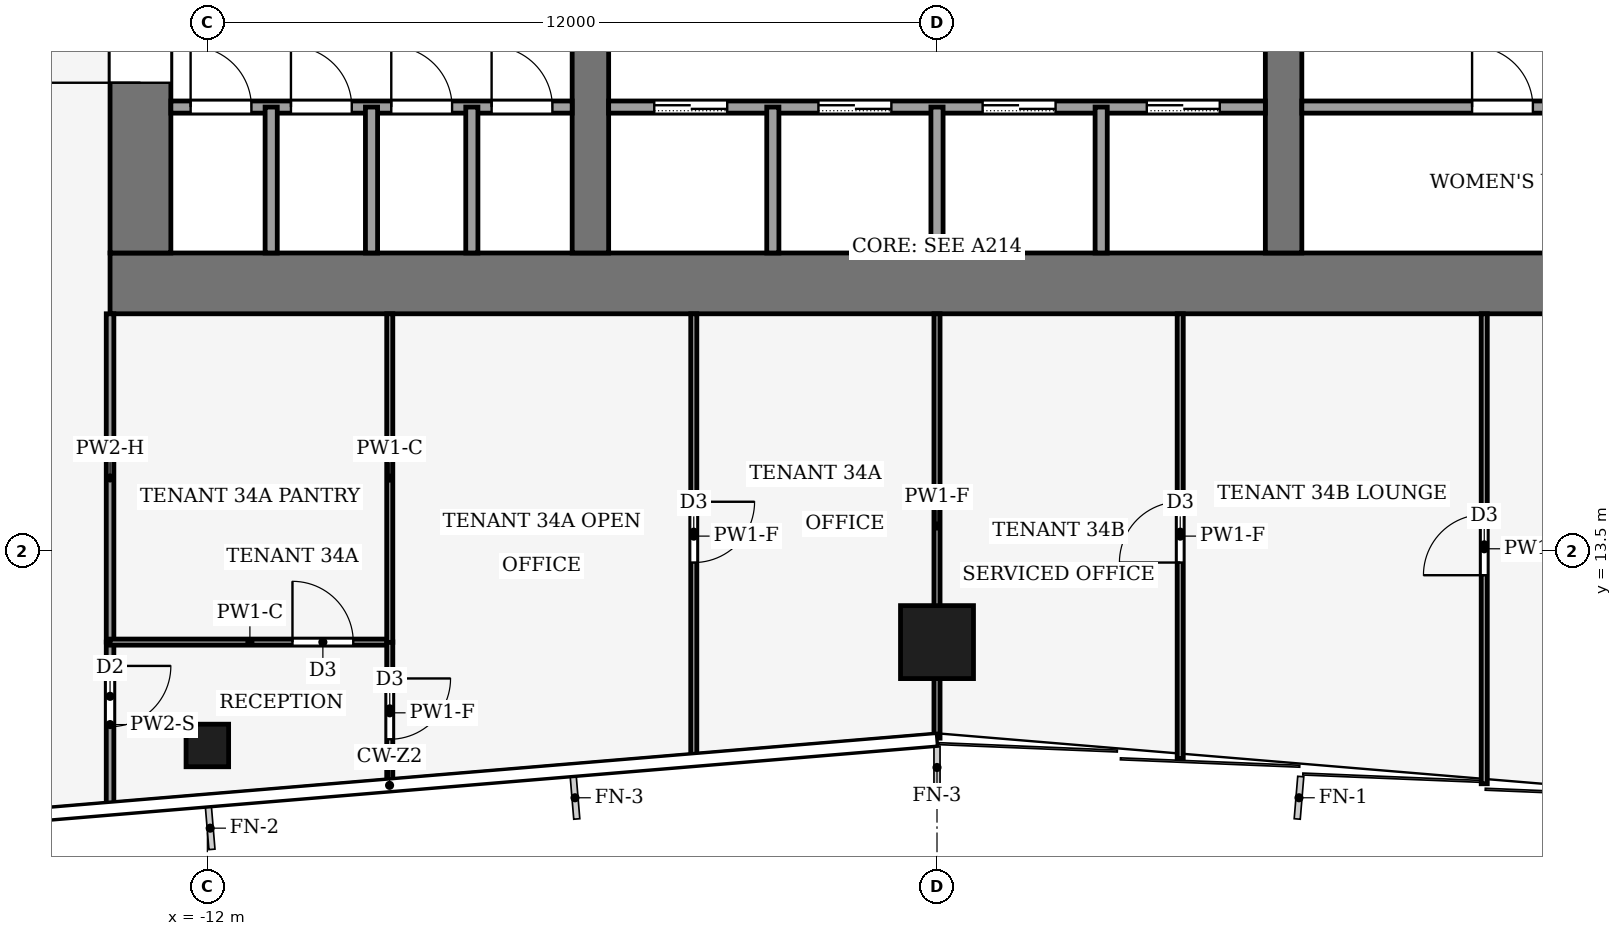
"""IFC4 building model, lengths in metres.
Left out: names, types, materials, properties, quantities, classifications, styles, units other than length and angle.
Written with IfcOpenShell. Run it as: python <this file> out.ifc"""

import sys

from ifc_helpers import new_model, si_unit, direction, frame, frame_2d, origin, origin_2d, place, context, subcontext, project, spatial, rectangle, hollow_rectangle, extrude, element, fill, save


model = new_model("IFC4")
c1 = context("Model", 3, precision=1e-05, world=origin(), true_north=direction((0.0, 1.0)))
c2 = subcontext(c1, "Body", "Model", "MODEL_VIEW")
j1 = project(units=[si_unit("LENGTHUNIT", "METRE"), si_unit("PLANEANGLEUNIT", "RADIAN")], contexts=[c1])
p1 = place(None, origin())
s1 = spatial("IfcSite", under=j1, at=p1, CompositionType="ELEMENT")
p2 = place(p1, origin())
s2 = spatial("IfcBuilding", under=s1, at=p2, CompositionType="ELEMENT")
p3 = place(p2, frame((0.0, 0.0, 150.0)))
s3 = spatial("IfcBuildingStorey", under=s2, at=p3, CompositionType="ELEMENT", Elevation=150.0)
p4 = place(p3, frame((-13.6, 17.9, -0.13), z_axis=(0.0, 0.0, 1.0), x_axis=(1.0, 0.0, 0.0)))
e1 = element("IfcWall", 1, at=p4, inside=s3, PredefinedType="SHEAR", context=c2, shape_type="SweptSolid", body=[
    extrude(rectangle(XDim=27.2, YDim=1.0, at=frame_2d((13.6, 0.0))), origin(), (0.0, 0.0, 1.0), 4.0),
])
p5 = place(p3, frame((-13.1, 18.4, -0.13), z_axis=(0.0, 0.0, 1.0), x_axis=(0.0, 1.0, 0.0)))
e2 = element("IfcWall", 2, at=p5, inside=s3, PredefinedType="SHEAR", context=c2, shape_type="SweptSolid", body=[
    extrude(rectangle(XDim=19.2, YDim=1.0, at=frame_2d((9.6, 0.0))), origin(), (0.0, 0.0, 1.0), 4.0),
])
p6 = place(p5, frame((2.8, 0.0, 0.13)))
e3 = element("IfcOpeningElement", 3, at=p6, cuts=e2, PredefinedType="OPENING", context=c2, shape_type="SweptSolid", body=[
    extrude(rectangle(XDim=2.4, YDim=2.4, at=frame_2d((1.2, 1.2))), frame((0.0, 0.51, 0.0), z_axis=(0.0, -1.0, 0.0), x_axis=(1.0, 0.0, 0.0)), (0.0, 0.0, 1.0), 1.02),
])
p7 = place(p5, frame((13.4, 0.0, 0.13)))
e4 = element("IfcOpeningElement", 4, at=p7, cuts=e2, PredefinedType="OPENING", context=c2, shape_type="SweptSolid", body=[
    extrude(rectangle(XDim=1.4, YDim=2.2, at=frame_2d((0.7, 1.1))), frame((0.0, 0.51, 0.0), z_axis=(0.0, -1.0, 0.0), x_axis=(1.0, 0.0, 0.0)), (0.0, 0.0, 1.0), 1.02),
])
p8 = place(p3, frame((-5.7, 18.4, -0.13), z_axis=(0.0, 0.0, 1.0), x_axis=(0.0, 1.0, 0.0)))
e5 = element("IfcWall", 5, at=p8, inside=s3, PredefinedType="SHEAR", context=c2, shape_type="SweptSolid", body=[
    extrude(rectangle(XDim=19.2, YDim=0.6, at=frame_2d((9.6, 0.0))), origin(), (0.0, 0.0, 1.0), 4.0),
])
p9 = place(p8, frame((8.35, 0.0, 0.13)))
e6 = element("IfcOpeningElement", 6, at=p9, cuts=e5, PredefinedType="OPENING", context=c2, shape_type="SweptSolid", body=[
    extrude(rectangle(XDim=0.9, YDim=2.1, at=frame_2d((0.45, 1.05))), frame((0.0, 0.31, 0.0), z_axis=(0.0, -1.0, 0.0), x_axis=(1.0, 0.0, 0.0)), (0.0, 0.0, 1.0), 0.62),
])
p10 = place(p3, frame((5.7, 18.4, -0.13), z_axis=(0.0, 0.0, 1.0), x_axis=(0.0, 1.0, 0.0)))
e7 = element("IfcWall", 7, at=p10, inside=s3, PredefinedType="SHEAR", context=c2, shape_type="SweptSolid", body=[
    extrude(rectangle(XDim=19.2, YDim=0.6, at=frame_2d((9.6, 0.0))), origin(), (0.0, 0.0, 1.0), 4.0),
])
p11 = place(p10, frame((8.35, 0.0, 0.13)))
e8 = element("IfcOpeningElement", 8, at=p11, cuts=e7, PredefinedType="OPENING", context=c2, shape_type="SweptSolid", body=[
    extrude(rectangle(XDim=0.9, YDim=2.1, at=frame_2d((0.45, 1.05))), frame((0.0, 0.31, 0.0), z_axis=(0.0, -1.0, 0.0), x_axis=(1.0, 0.0, 0.0)), (0.0, 0.0, 1.0), 0.62),
])
p12 = place(p10, frame((13.3, 0.0, 0.13)))
e9 = element("IfcOpeningElement", 9, at=p12, cuts=e7, PredefinedType="OPENING", context=c2, shape_type="SweptSolid", body=[
    extrude(rectangle(XDim=2.4, YDim=2.4, at=frame_2d((1.2, 1.2))), frame((0.0, 0.31, 0.0), z_axis=(0.0, -1.0, 0.0), x_axis=(1.0, 0.0, 0.0)), (0.0, 0.0, 1.0), 0.62),
])
p13 = place(p3, frame((0.0, 12.0, 0.0), z_axis=(0.0, 0.0, 1.0), x_axis=(1.0, 0.0, 0.0)))
e10 = element("IfcColumn", 10, at=p13, inside=s3, PredefinedType="COLUMN", context=c2, shape_type="SweptSolid", body=[
    extrude(hollow_rectangle(XDim=1.2, YDim=1.2, WallThickness=0.07, at=origin_2d()), origin(), (0.0, 0.0, 1.0), 4.0),
])
p14 = place(p3, frame((-12.0, 10.3, 0.0), z_axis=(0.0, 0.0, 1.0), x_axis=(1.0, 0.0, 0.0)))
e11 = element("IfcColumn", 11, at=p14, inside=s3, PredefinedType="COLUMN", context=c2, shape_type="SweptSolid", body=[
    extrude(hollow_rectangle(XDim=0.7, YDim=0.7, WallThickness=0.03, at=origin_2d()), origin(), (0.0, 0.0, 1.0), 4.0),
])
p15 = place(p3, frame((-12.6, 20.8, 0.0), z_axis=(0.0, 0.0, 1.0), x_axis=(1.0, 0.0, 0.0)))
e12 = element("IfcWall", 12, at=p15, inside=s3, PredefinedType="PARTITIONING", context=c2, shape_type="SweptSolid", body=[
    extrude(rectangle(XDim=6.6, YDim=0.2, at=frame_2d((3.3, 0.0))), origin(), (0.0, 0.0, 1.0), 3.87),
])
p16 = place(p15, frame((0.325, 0.0, 0.0)))
e13 = element("IfcOpeningElement", 13, at=p16, cuts=e12, PredefinedType="OPENING", context=c2, shape_type="SweptSolid", body=[
    extrude(rectangle(XDim=1.0, YDim=2.1, at=frame_2d((0.5, 1.05))), frame((0.0, 0.11, 0.0), z_axis=(0.0, -1.0, 0.0), x_axis=(1.0, 0.0, 0.0)), (0.0, 0.0, 1.0), 0.22),
])
p17 = place(p15, frame((1.975, 0.0, 0.0)))
e14 = element("IfcOpeningElement", 14, at=p17, cuts=e12, PredefinedType="OPENING", context=c2, shape_type="SweptSolid", body=[
    extrude(rectangle(XDim=1.0, YDim=2.1, at=frame_2d((0.5, 1.05))), frame((0.0, 0.11, 0.0), z_axis=(0.0, -1.0, 0.0), x_axis=(1.0, 0.0, 0.0)), (0.0, 0.0, 1.0), 0.22),
])
p18 = place(p15, frame((3.625, 0.0, 0.0)))
e15 = element("IfcOpeningElement", 15, at=p18, cuts=e12, PredefinedType="OPENING", context=c2, shape_type="SweptSolid", body=[
    extrude(rectangle(XDim=1.0, YDim=2.1, at=frame_2d((0.5, 1.05))), frame((0.0, 0.11, 0.0), z_axis=(0.0, -1.0, 0.0), x_axis=(1.0, 0.0, 0.0)), (0.0, 0.0, 1.0), 0.22),
])
p19 = place(p15, frame((5.275, 0.0, 0.0)))
e16 = element("IfcOpeningElement", 16, at=p19, cuts=e12, PredefinedType="OPENING", context=c2, shape_type="SweptSolid", body=[
    extrude(rectangle(XDim=1.0, YDim=2.1, at=frame_2d((0.5, 1.05))), frame((0.0, 0.11, 0.0), z_axis=(0.0, -1.0, 0.0), x_axis=(1.0, 0.0, 0.0)), (0.0, 0.0, 1.0), 0.22),
])
p20 = place(p3, frame((-5.4, 20.8, 0.0), z_axis=(0.0, 0.0, 1.0), x_axis=(1.0, 0.0, 0.0)))
e17 = element("IfcWall", 17, at=p20, inside=s3, PredefinedType="PARTITIONING", context=c2, shape_type="SweptSolid", body=[
    extrude(rectangle(XDim=10.8, YDim=0.2, at=frame_2d((5.4, 0.0))), origin(), (0.0, 0.0, 1.0), 3.87),
])
p21 = place(p20, frame((0.75, 0.0, 0.0)))
e18 = element("IfcOpeningElement", 18, at=p21, cuts=e17, PredefinedType="OPENING", context=c2, shape_type="SweptSolid", body=[
    extrude(rectangle(XDim=1.2, YDim=2.2, at=frame_2d((0.6, 1.1))), frame((0.0, 0.11, 0.0), z_axis=(0.0, -1.0, 0.0), x_axis=(1.0, 0.0, 0.0)), (0.0, 0.0, 1.0), 0.22),
])
p22 = place(p20, frame((3.45, 0.0, 0.0)))
e19 = element("IfcOpeningElement", 19, at=p22, cuts=e17, PredefinedType="OPENING", context=c2, shape_type="SweptSolid", body=[
    extrude(rectangle(XDim=1.2, YDim=2.2, at=frame_2d((0.6, 1.1))), frame((0.0, 0.11, 0.0), z_axis=(0.0, -1.0, 0.0), x_axis=(1.0, 0.0, 0.0)), (0.0, 0.0, 1.0), 0.22),
])
p23 = place(p20, frame((6.15, 0.0, 0.0)))
e20 = element("IfcOpeningElement", 20, at=p23, cuts=e17, PredefinedType="OPENING", context=c2, shape_type="SweptSolid", body=[
    extrude(rectangle(XDim=1.2, YDim=2.2, at=frame_2d((0.6, 1.1))), frame((0.0, 0.11, 0.0), z_axis=(0.0, -1.0, 0.0), x_axis=(1.0, 0.0, 0.0)), (0.0, 0.0, 1.0), 0.22),
])
p24 = place(p20, frame((8.85, 0.0, 0.0)))
e21 = element("IfcOpeningElement", 21, at=p24, cuts=e17, PredefinedType="OPENING", context=c2, shape_type="SweptSolid", body=[
    extrude(rectangle(XDim=1.2, YDim=2.2, at=frame_2d((0.6, 1.1))), frame((0.0, 0.11, 0.0), z_axis=(0.0, -1.0, 0.0), x_axis=(1.0, 0.0, 0.0)), (0.0, 0.0, 1.0), 0.22),
])
p25 = place(p3, frame((6.0, 20.8, 0.0), z_axis=(0.0, 0.0, 1.0), x_axis=(1.0, 0.0, 0.0)))
e22 = element("IfcWall", 22, at=p25, inside=s3, PredefinedType="PARTITIONING", context=c2, shape_type="SweptSolid", body=[
    extrude(rectangle(XDim=6.6, YDim=0.2, at=frame_2d((3.3, 0.0))), origin(), (0.0, 0.0, 1.0), 3.87),
])
p26 = place(p25, frame((2.8, 0.0, 0.0)))
e23 = element("IfcOpeningElement", 23, at=p26, cuts=e22, PredefinedType="OPENING", context=c2, shape_type="SweptSolid", body=[
    extrude(rectangle(XDim=1.0, YDim=2.1, at=frame_2d((0.5, 1.05))), frame((0.0, 0.11, 0.0), z_axis=(0.0, -1.0, 0.0), x_axis=(1.0, 0.0, 0.0)), (0.0, 0.0, 1.0), 0.22),
])
for number, where, z_axis, x_axis in (
    (24, (-10.95, 18.4, 0.0), (0.0, 0.0, 1.0), (0.0, 1.0, 0.0)),
    (25, (-9.3, 18.4, 0.0), (0.0, 0.0, 1.0), (0.0, 1.0, 0.0)),
    (26, (-7.65, 18.4, 0.0), (0.0, 0.0, 1.0), (0.0, 1.0, 0.0)),
    (27, (-2.7, 18.4, 0.0), (0.0, 0.0, 1.0), (0.0, 1.0, 0.0)),
    (28, (0.0, 18.4, 0.0), (0.0, 0.0, 1.0), (0.0, 1.0, 0.0)),
    (29, (2.7, 18.4, 0.0), (0.0, 0.0, 1.0), (0.0, 1.0, 0.0)),
):
    element("IfcWall", number, at=place(p3, frame(where, z_axis=z_axis, x_axis=x_axis)), inside=s3, PredefinedType="PARTITIONING", context=c2, shape_type="SweptSolid", body=[
        extrude(rectangle(XDim=2.4, YDim=0.2, at=frame_2d((1.2, 0.0))), origin(), (0.0, 0.0, 1.0), 3.87),
    ])
p27 = place(p3, frame((-13.6, 12.0, 0.0), z_axis=(0.0, 0.0, 1.0), x_axis=(0.0, -1.0, 0.0)))
e30 = element("IfcWall", 30, at=p27, inside=s3, PredefinedType="PARTITIONING", context=c2, shape_type="SweptSolid", body=[
    extrude(rectangle(XDim=2.713, YDim=0.125, at=frame_2d((1.357, 0.0))), origin(), (0.0, 0.0, 1.0), 3.04),
])
p28 = place(p27, frame((0.392, 0.0, 0.0)))
e31 = element("IfcOpeningElement", 31, at=p28, cuts=e30, PredefinedType="OPENING", context=c2, shape_type="SweptSolid", body=[
    extrude(rectangle(XDim=1.0, YDim=2.1, at=frame_2d((0.5, 1.05))), frame((0.0, 0.073, 0.0), z_axis=(0.0, -1.0, 0.0), x_axis=(1.0, 0.0, 0.0)), (0.0, 0.0, 1.0), 0.145),
])
p29 = place(p3, frame((-13.6, 12.0, 0.0), z_axis=(0.0, 0.0, 1.0), x_axis=(0.0, 1.0, 0.0)))
e32 = element("IfcWall", 32, at=p29, inside=s3, PredefinedType="PARTITIONING", context=c2, shape_type="SweptSolid", body=[
    extrude(rectangle(XDim=5.4, YDim=0.125, at=frame_2d((2.7, 0.0))), origin(), (0.0, 0.0, 1.0), 3.14),
])
p30 = place(p3, frame((-13.6, 12.0, 0.0), z_axis=(0.0, 0.0, 1.0), x_axis=(1.0, 0.0, 0.0)))
e33 = element("IfcWall", 33, at=p30, inside=s3, PredefinedType="PARTITIONING", context=c2, shape_type="SweptSolid", body=[
    extrude(rectangle(XDim=4.6, YDim=0.1, at=frame_2d((2.3, 0.0))), origin(), (0.0, 0.0, 1.0), 3.87),
])
p31 = place(p30, frame((3.0, 0.0, 0.0)))
e34 = element("IfcOpeningElement", 34, at=p31, cuts=e33, PredefinedType="OPENING", context=c2, shape_type="SweptSolid", body=[
    extrude(rectangle(XDim=1.0, YDim=2.1, at=frame_2d((0.5, 1.05))), frame((0.0, 0.06, 0.0), z_axis=(0.0, -1.0, 0.0), x_axis=(1.0, 0.0, 0.0)), (0.0, 0.0, 1.0), 0.12),
])
p32 = place(p3, frame((-9.0, 12.004, 0.0), z_axis=(0.0, 0.0, 1.0), x_axis=(0.0, -1.0, 0.0)))
e35 = element("IfcWall", 35, at=p32, inside=s3, PredefinedType="PARTITIONING", context=c2, shape_type="SweptSolid", body=[
    extrude(rectangle(XDim=2.334, YDim=0.1, at=frame_2d((1.167, 0.0))), origin(), (0.0, 0.0, 1.0), 3.04),
])
p33 = place(p32, frame((0.602, 0.0, 0.0)))
e36 = element("IfcOpeningElement", 36, at=p33, cuts=e35, PredefinedType="OPENING", context=c2, shape_type="SweptSolid", body=[
    extrude(rectangle(XDim=1.0, YDim=2.1, at=frame_2d((0.5, 1.05))), frame((0.0, 0.06, 0.0), z_axis=(0.0, -1.0, 0.0), x_axis=(1.0, 0.0, 0.0)), (0.0, 0.0, 1.0), 0.12),
])
p34 = place(p3, frame((-9.0, 11.996, 0.0), z_axis=(0.0, 0.0, 1.0), x_axis=(0.0, 1.0, 0.0)))
e37 = element("IfcWall", 37, at=p34, inside=s3, PredefinedType="PARTITIONING", context=c2, shape_type="SweptSolid", body=[
    extrude(rectangle(XDim=5.404, YDim=0.1, at=frame_2d((2.702, 0.0))), origin(), (0.0, 0.0, 1.0), 3.87),
])
p35 = place(p3, frame((-4.0, 17.4, 0.0), z_axis=(0.0, 0.0, 1.0), x_axis=(0.0, -1.0, 0.0)))
e38 = element("IfcWall", 38, at=p35, inside=s3, PredefinedType="PARTITIONING", context=c2, shape_type="SweptSolid", body=[
    extrude(rectangle(XDim=7.313, YDim=0.1, at=frame_2d((3.657, 0.0))), origin(), (0.0, 0.0, 1.0), 3.04),
])
p36 = place(p35, frame((3.092, 0.0, 0.0)))
e39 = element("IfcOpeningElement", 39, at=p36, cuts=e38, PredefinedType="OPENING", context=c2, shape_type="SweptSolid", body=[
    extrude(rectangle(XDim=1.0, YDim=2.1, at=frame_2d((0.5, 1.05))), frame((0.0, 0.06, 0.0), z_axis=(0.0, -1.0, 0.0), x_axis=(1.0, 0.0, 0.0)), (0.0, 0.0, 1.0), 0.12),
])
p37 = place(p3, frame((0.0, 10.42, 0.0), z_axis=(0.0, 0.0, 1.0), x_axis=(0.0, 1.0, 0.0)))
e40 = element("IfcWall", 40, at=p37, inside=s3, PredefinedType="PARTITIONING", context=c2, shape_type="SweptSolid", body=[
    extrude(rectangle(XDim=6.98, YDim=0.1, at=frame_2d((3.49, 0.0))), origin(), (0.0, 0.0, 1.0), 3.04),
])
p38 = place(p3, frame((9.0, 9.67, 0.0), z_axis=(0.0, 0.0, 1.0), x_axis=(0.0, 1.0, 0.0)))
e41 = element("IfcWall", 41, at=p38, inside=s3, PredefinedType="PARTITIONING", context=c2, shape_type="SweptSolid", body=[
    extrude(rectangle(XDim=7.73, YDim=0.1, at=frame_2d((3.865, 0.0))), origin(), (0.0, 0.0, 1.0), 3.04),
])
p39 = place(p38, frame((3.43, 0.0, 0.0)))
e42 = element("IfcOpeningElement", 42, at=p39, cuts=e41, PredefinedType="OPENING", context=c2, shape_type="SweptSolid", body=[
    extrude(rectangle(XDim=1.0, YDim=2.1, at=frame_2d((0.5, 1.05))), frame((0.0, 0.06, 0.0), z_axis=(0.0, -1.0, 0.0), x_axis=(1.0, 0.0, 0.0)), (0.0, 0.0, 1.0), 0.12),
])
p40 = place(p3, frame((4.0, 10.087, 0.0), z_axis=(0.0, 0.0, 1.0), x_axis=(0.0, 1.0, 0.0)))
e43 = element("IfcWall", 43, at=p40, inside=s3, PredefinedType="PARTITIONING", context=c2, shape_type="SweptSolid", body=[
    extrude(rectangle(XDim=7.313, YDim=0.1, at=frame_2d((3.657, 0.0))), origin(), (0.0, 0.0, 1.0), 3.04),
])
p41 = place(p40, frame((3.222, 0.0, 0.0)))
e44 = element("IfcOpeningElement", 44, at=p41, cuts=e43, PredefinedType="OPENING", context=c2, shape_type="SweptSolid", body=[
    extrude(rectangle(XDim=1.0, YDim=2.1, at=frame_2d((0.5, 1.05))), frame((0.0, 0.06, 0.0), z_axis=(0.0, -1.0, 0.0), x_axis=(1.0, 0.0, 0.0)), (0.0, 0.0, 1.0), 0.12),
])
p42 = place(p21, origin())
e45 = element("IfcDoor", 45, at=p42, inside=s3, OperationType="SLIDING_TO_LEFT", PredefinedType="DOOR", context=c2, shape_type="SweptSolid", body=[
    extrude(rectangle(XDim=1.2, YDim=2.2, at=frame_2d((0.6, 1.1))), frame((0.0, 0.025, 0.0), z_axis=(0.0, -1.0, 0.0), x_axis=(1.0, 0.0, 0.0)), (0.0, 0.0, 1.0), 0.05),
])
fill(e18, e45)
p43 = place(p22, origin())
e46 = element("IfcDoor", 46, at=p43, inside=s3, OperationType="SLIDING_TO_LEFT", PredefinedType="DOOR", context=c2, shape_type="SweptSolid", body=[
    extrude(rectangle(XDim=1.2, YDim=2.2, at=frame_2d((0.6, 1.1))), frame((0.0, 0.025, 0.0), z_axis=(0.0, -1.0, 0.0), x_axis=(1.0, 0.0, 0.0)), (0.0, 0.0, 1.0), 0.05),
])
fill(e19, e46)
p44 = place(p23, origin())
e47 = element("IfcDoor", 47, at=p44, inside=s3, OperationType="SLIDING_TO_LEFT", PredefinedType="DOOR", context=c2, shape_type="SweptSolid", body=[
    extrude(rectangle(XDim=1.2, YDim=2.2, at=frame_2d((0.6, 1.1))), frame((0.0, 0.025, 0.0), z_axis=(0.0, -1.0, 0.0), x_axis=(1.0, 0.0, 0.0)), (0.0, 0.0, 1.0), 0.05),
])
fill(e20, e47)
p45 = place(p24, origin())
e48 = element("IfcDoor", 48, at=p45, inside=s3, OperationType="SLIDING_TO_LEFT", PredefinedType="DOOR", context=c2, shape_type="SweptSolid", body=[
    extrude(rectangle(XDim=1.2, YDim=2.2, at=frame_2d((0.6, 1.1))), frame((0.0, 0.025, 0.0), z_axis=(0.0, -1.0, 0.0), x_axis=(1.0, 0.0, 0.0)), (0.0, 0.0, 1.0), 0.05),
])
fill(e21, e48)
p46 = place(p16, origin())
e49 = element("IfcDoor", 49, at=p46, inside=s3, OperationType="SINGLE_SWING_RIGHT", PredefinedType="DOOR", context=c2, shape_type="SweptSolid", body=[
    extrude(rectangle(XDim=1.0, YDim=2.1, at=frame_2d((0.5, 1.05))), frame((0.0, 0.025, 0.0), z_axis=(0.0, -1.0, 0.0), x_axis=(1.0, 0.0, 0.0)), (0.0, 0.0, 1.0), 0.05),
])
fill(e13, e49)
p47 = place(p17, origin())
e50 = element("IfcDoor", 50, at=p47, inside=s3, OperationType="SINGLE_SWING_RIGHT", PredefinedType="DOOR", context=c2, shape_type="SweptSolid", body=[
    extrude(rectangle(XDim=1.0, YDim=2.1, at=frame_2d((0.5, 1.05))), frame((0.0, 0.025, 0.0), z_axis=(0.0, -1.0, 0.0), x_axis=(1.0, 0.0, 0.0)), (0.0, 0.0, 1.0), 0.05),
])
fill(e14, e50)
p48 = place(p18, origin())
e51 = element("IfcDoor", 51, at=p48, inside=s3, OperationType="SINGLE_SWING_LEFT", PredefinedType="DOOR", context=c2, shape_type="SweptSolid", body=[
    extrude(rectangle(XDim=1.0, YDim=2.1, at=frame_2d((0.5, 1.05))), frame((0.0, 0.025, 0.0), z_axis=(0.0, -1.0, 0.0), x_axis=(1.0, 0.0, 0.0)), (0.0, 0.0, 1.0), 0.05),
])
fill(e15, e51)
p49 = place(p19, origin())
e52 = element("IfcDoor", 52, at=p49, inside=s3, OperationType="SINGLE_SWING_LEFT", PredefinedType="DOOR", context=c2, shape_type="SweptSolid", body=[
    extrude(rectangle(XDim=1.0, YDim=2.1, at=frame_2d((0.5, 1.05))), frame((0.0, 0.025, 0.0), z_axis=(0.0, -1.0, 0.0), x_axis=(1.0, 0.0, 0.0)), (0.0, 0.0, 1.0), 0.05),
])
fill(e16, e52)
p50 = place(p26, origin())
e53 = element("IfcDoor", 53, at=p50, inside=s3, OperationType="SINGLE_SWING_LEFT", PredefinedType="DOOR", context=c2, shape_type="SweptSolid", body=[
    extrude(rectangle(XDim=1.0, YDim=2.1, at=frame_2d((0.5, 1.05))), frame((0.0, 0.025, 0.0), z_axis=(0.0, -1.0, 0.0), x_axis=(1.0, 0.0, 0.0)), (0.0, 0.0, 1.0), 0.05),
])
fill(e23, e53)
p51 = place(p6, origin())
e54 = element("IfcDoor", 54, at=p51, inside=s3, OperationType="DOUBLE_DOOR_SINGLE_SWING", PredefinedType="DOOR", context=c2, shape_type="SweptSolid", body=[
    extrude(rectangle(XDim=2.4, YDim=2.4, at=frame_2d((1.2, 1.2))), frame((0.0, 0.025, 0.0), z_axis=(0.0, -1.0, 0.0), x_axis=(1.0, 0.0, 0.0)), (0.0, 0.0, 1.0), 0.05),
])
fill(e3, e54)
p52 = place(p28, origin())
e55 = element("IfcDoor", 55, at=p52, inside=s3, OperationType="SINGLE_SWING_LEFT", PredefinedType="DOOR", context=c2, shape_type="SweptSolid", body=[
    extrude(rectangle(XDim=1.0, YDim=2.1, at=frame_2d((0.5, 1.05))), frame((0.0, 0.025, 0.0), z_axis=(0.0, -1.0, 0.0), x_axis=(1.0, 0.0, 0.0)), (0.0, 0.0, 1.0), 0.05),
])
fill(e31, e55)
p53 = place(p31, origin())
e56 = element("IfcDoor", 56, at=p53, inside=s3, OperationType="SINGLE_SWING_RIGHT", PredefinedType="DOOR", context=c2, shape_type="SweptSolid", body=[
    extrude(rectangle(XDim=1.0, YDim=2.1, at=frame_2d((0.5, 1.05))), frame((0.0, 0.025, 0.0), z_axis=(0.0, -1.0, 0.0), x_axis=(1.0, 0.0, 0.0)), (0.0, 0.0, 1.0), 0.05),
])
fill(e34, e56)
p54 = place(p33, origin())
e57 = element("IfcDoor", 57, at=p54, inside=s3, OperationType="SINGLE_SWING_LEFT", PredefinedType="DOOR", context=c2, shape_type="SweptSolid", body=[
    extrude(rectangle(XDim=1.0, YDim=2.1, at=frame_2d((0.5, 1.05))), frame((0.0, 0.025, 0.0), z_axis=(0.0, -1.0, 0.0), x_axis=(1.0, 0.0, 0.0)), (0.0, 0.0, 1.0), 0.05),
])
fill(e36, e57)
p55 = place(p36, origin())
e58 = element("IfcDoor", 58, at=p55, inside=s3, OperationType="SINGLE_SWING_LEFT", PredefinedType="DOOR", context=c2, shape_type="SweptSolid", body=[
    extrude(rectangle(XDim=1.0, YDim=2.1, at=frame_2d((0.5, 1.05))), frame((0.0, 0.025, 0.0), z_axis=(0.0, -1.0, 0.0), x_axis=(1.0, 0.0, 0.0)), (0.0, 0.0, 1.0), 0.05),
])
fill(e39, e58)
p56 = place(p39, origin())
e59 = element("IfcDoor", 59, at=p56, inside=s3, OperationType="SINGLE_SWING_RIGHT", PredefinedType="DOOR", context=c2, shape_type="SweptSolid", body=[
    extrude(rectangle(XDim=1.0, YDim=2.1, at=frame_2d((0.5, 1.05))), frame((0.0, 0.025, 0.0), z_axis=(0.0, -1.0, 0.0), x_axis=(1.0, 0.0, 0.0)), (0.0, 0.0, 1.0), 0.05),
])
fill(e42, e59)
p57 = place(p41, origin())
e60 = element("IfcDoor", 60, at=p57, inside=s3, OperationType="SINGLE_SWING_RIGHT", PredefinedType="DOOR", context=c2, shape_type="SweptSolid", body=[
    extrude(rectangle(XDim=1.0, YDim=2.1, at=frame_2d((0.5, 1.05))), frame((0.0, 0.025, 0.0), z_axis=(0.0, -1.0, 0.0), x_axis=(1.0, 0.0, 0.0)), (0.0, 0.0, 1.0), 0.05),
])
fill(e44, e60)
save(model, sys.argv[1])
